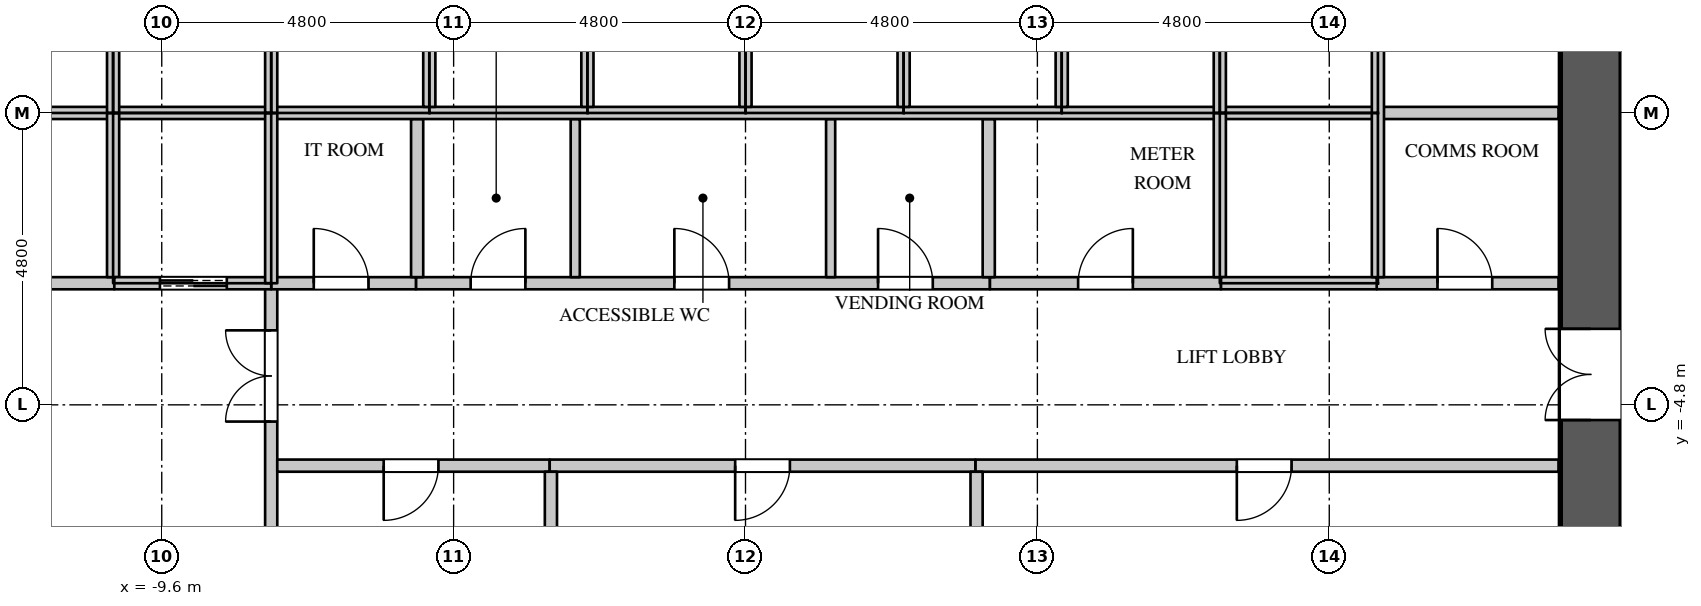
"""IFC4 building model, lengths in metres.
Left out: names, types, materials, properties, quantities, classifications, styles, units other than length and angle.
Written with IfcOpenShell. Run it as: python <this file> out.ifc"""

import sys

from ifc_helpers import new_model, si_unit, direction, frame, frame_2d, origin, place, context, subcontext, project, spatial, rectangle, extrude, element, fill, save


model = new_model("IFC4")
c1 = context("Model", 3, precision=1e-05, world=origin(), true_north=direction((0.0, 1.0)))
c2 = subcontext(c1, "Body", "Model", "MODEL_VIEW")
j1 = project(units=[si_unit("LENGTHUNIT", "METRE"), si_unit("PLANEANGLEUNIT", "RADIAN")], contexts=[c1])
p1 = place(None, origin())
s1 = spatial("IfcSite", under=j1, at=p1, CompositionType="ELEMENT")
p2 = place(p1, origin())
s2 = spatial("IfcBuilding", under=s1, at=p2, CompositionType="ELEMENT")
p3 = place(p2, frame((0.0, 0.0, 71.7)))
s3 = spatial("IfcBuildingStorey", under=s2, at=p3, CompositionType="ELEMENT", Elevation=71.7)
p4 = place(p3, frame((13.9, -11.0, 0.0), z_axis=(0.0, 0.0, 1.0), x_axis=(0.0, 1.0, 0.0)))
e1 = element("IfcWall", 1, at=p4, inside=s3, PredefinedType="SHEAR", context=c2, shape_type="SweptSolid", body=[
    extrude(rectangle(XDim=22.0, YDim=1.0, at=frame_2d((11.0, 0.0))), origin(), (0.0, 0.0, 1.0), 4.2),
])
p5 = place(p4, frame((20.05, 0.0, 0.0)))
e2 = element("IfcOpeningElement", 2, at=p5, cuts=e1, PredefinedType="OPENING", context=c2, shape_type="SweptSolid", body=[
    extrude(rectangle(XDim=1.1, YDim=2.2, at=frame_2d((0.55, 1.1))), frame((0.0, 0.51, 0.0), z_axis=(0.0, -1.0, 0.0), x_axis=(1.0, 0.0, 0.0)), (0.0, 0.0, 1.0), 1.02),
])
p6 = place(p4, frame((0.85, 0.0, 0.0)))
e3 = element("IfcOpeningElement", 3, at=p6, cuts=e1, PredefinedType="OPENING", context=c2, shape_type="SweptSolid", body=[
    extrude(rectangle(XDim=1.1, YDim=2.2, at=frame_2d((0.55, 1.1))), frame((0.0, 0.51, 0.0), z_axis=(0.0, -1.0, 0.0), x_axis=(1.0, 0.0, 0.0)), (0.0, 0.0, 1.0), 1.02),
])
p7 = place(p4, frame((14.55, 0.0, 0.0)))
e4 = element("IfcOpeningElement", 4, at=p7, cuts=e1, PredefinedType="OPENING", context=c2, shape_type="SweptSolid", body=[
    extrude(rectangle(XDim=1.5, YDim=2.4, at=frame_2d((0.75, 1.2))), frame((0.0, 0.51, 0.0), z_axis=(0.0, -1.0, 0.0), x_axis=(1.0, 0.0, 0.0)), (0.0, 0.0, 1.0), 1.02),
])
p8 = place(p4, frame((5.95, 0.0, 0.0)))
e5 = element("IfcOpeningElement", 5, at=p8, cuts=e1, PredefinedType="OPENING", context=c2, shape_type="SweptSolid", body=[
    extrude(rectangle(XDim=1.5, YDim=2.4, at=frame_2d((0.75, 1.2))), frame((0.0, 0.51, 0.0), z_axis=(0.0, -1.0, 0.0), x_axis=(1.0, 0.0, 0.0)), (0.0, 0.0, 1.0), 1.02),
])
p9 = place(p3, frame((-7.8, -8.075, 0.0), z_axis=(0.0, 0.0, 1.0), x_axis=(0.0, 1.0, 0.0)))
e6 = element("IfcWall", 6, at=p9, inside=s3, PredefinedType="PARTITIONING", context=c2, shape_type="SweptSolid", body=[
    extrude(rectangle(XDim=5.275, YDim=0.2, at=frame_2d((2.637, 0.0))), origin(), (0.0, 0.0, 1.0), 3.95),
])
p10 = place(p9, frame((3.0, 0.0, 0.0)))
e7 = element("IfcOpeningElement", 7, at=p10, cuts=e6, PredefinedType="OPENING", context=c2, shape_type="SweptSolid", body=[
    extrude(rectangle(XDim=1.5, YDim=2.4, at=frame_2d((0.75, 1.2))), frame((0.0, 0.11, 0.0), z_axis=(0.0, -1.0, 0.0), x_axis=(1.0, 0.0, 0.0)), (0.0, 0.0, 1.0), 0.22),
])
p11 = place(p3, frame((-7.7, -5.8, 0.0), z_axis=(0.0, 0.0, 1.0), x_axis=(1.0, 0.0, 0.0)))
e8 = element("IfcWall", 8, at=p11, inside=s3, PredefinedType="PARTITIONING", context=c2, shape_type="SweptSolid", body=[
    extrude(rectangle(XDim=4.48, YDim=0.2, at=frame_2d((2.24, 0.0))), origin(), (0.0, 0.0, 1.0), 3.95),
])
p12 = place(p11, frame((1.75, 0.0, 0.0)))
e9 = element("IfcOpeningElement", 9, at=p12, cuts=e8, PredefinedType="OPENING", context=c2, shape_type="SweptSolid", body=[
    extrude(rectangle(XDim=0.9, YDim=2.2, at=frame_2d((0.45, 1.1))), frame((0.0, 0.11, 0.0), z_axis=(0.0, -1.0, 0.0), x_axis=(1.0, 0.0, 0.0)), (0.0, 0.0, 1.0), 0.22),
])
p13 = place(p3, frame((-5.42, -2.8, 0.0), z_axis=(0.0, 0.0, 1.0), x_axis=(1.0, 0.0, 0.0)))
e10 = element("IfcWall", 10, at=p13, inside=s3, PredefinedType="PARTITIONING", context=c2, shape_type="SweptSolid", body=[
    extrude(rectangle(XDim=9.44, YDim=0.2, at=frame_2d((4.72, 0.0))), origin(), (0.0, 0.0, 1.0), 3.95),
])
p14 = place(p13, frame((0.9, 0.0, 0.0)))
e11 = element("IfcOpeningElement", 11, at=p14, cuts=e10, PredefinedType="OPENING", context=c2, shape_type="SweptSolid", body=[
    extrude(rectangle(XDim=0.9, YDim=2.2, at=frame_2d((0.45, 1.1))), frame((0.0, 0.11, 0.0), z_axis=(0.0, -1.0, 0.0), x_axis=(1.0, 0.0, 0.0)), (0.0, 0.0, 1.0), 0.22),
])
p15 = place(p13, frame((4.25, 0.0, 0.0)))
e12 = element("IfcOpeningElement", 12, at=p15, cuts=e10, PredefinedType="OPENING", context=c2, shape_type="SweptSolid", body=[
    extrude(rectangle(XDim=0.9, YDim=2.2, at=frame_2d((0.45, 1.1))), frame((0.0, 0.11, 0.0), z_axis=(0.0, -1.0, 0.0), x_axis=(1.0, 0.0, 0.0)), (0.0, 0.0, 1.0), 0.22),
])
p16 = place(p13, frame((7.6, 0.0, 0.0)))
e13 = element("IfcOpeningElement", 13, at=p16, cuts=e10, PredefinedType="OPENING", context=c2, shape_type="SweptSolid", body=[
    extrude(rectangle(XDim=0.9, YDim=2.2, at=frame_2d((0.45, 1.1))), frame((0.0, 0.11, 0.0), z_axis=(0.0, -1.0, 0.0), x_axis=(1.0, 0.0, 0.0)), (0.0, 0.0, 1.0), 0.22),
])
p17 = place(p3, frame((3.78, -5.8, 0.0), z_axis=(0.0, 0.0, 1.0), x_axis=(1.0, 0.0, 0.0)))
e14 = element("IfcWall", 14, at=p17, inside=s3, PredefinedType="PARTITIONING", context=c2, shape_type="SweptSolid", body=[
    extrude(rectangle(XDim=9.59, YDim=0.2, at=frame_2d((4.795, 0.0))), origin(), (0.0, 0.0, 1.0), 3.95),
])
p18 = place(p17, frame((4.3, 0.0, 0.0)))
e15 = element("IfcOpeningElement", 15, at=p18, cuts=e14, PredefinedType="OPENING", context=c2, shape_type="SweptSolid", body=[
    extrude(rectangle(XDim=0.9, YDim=2.2, at=frame_2d((0.45, 1.1))), frame((0.0, 0.11, 0.0), z_axis=(0.0, -1.0, 0.0), x_axis=(1.0, 0.0, 0.0)), (0.0, 0.0, 1.0), 0.22),
])
for number, where, z_axis, x_axis in (
    (16, (-2.8, -2.7, 0.0), (0.0, 0.0, 1.0), (0.0, 1.0, 0.0)),
    (17, (1.4, -2.7, 0.0), (0.0, 0.0, 1.0), (0.0, 1.0, 0.0)),
):
    element("IfcWall", number, at=place(p3, frame(where, z_axis=z_axis, x_axis=x_axis)), inside=s3, PredefinedType="PARTITIONING", context=c2, shape_type="SweptSolid", body=[
        extrude(rectangle(XDim=2.6, YDim=0.15, at=frame_2d((1.3, 0.0))), origin(), (0.0, 0.0, 1.0), 3.95),
    ])
p19 = place(p3, frame((-13.37, -2.8, 0.0), z_axis=(0.0, 0.0, 1.0), x_axis=(1.0, 0.0, 0.0)))
e18 = element("IfcWall", 18, at=p19, inside=s3, PredefinedType="PARTITIONING", context=c2, shape_type="SweptSolid", body=[
    extrude(rectangle(XDim=2.99, YDim=0.2, at=frame_2d((1.495, 0.0))), origin(), (0.0, 0.0, 1.0), 3.95),
])
p20 = place(p19, frame((1.2, 0.0, 0.0)))
e19 = element("IfcOpeningElement", 19, at=p20, cuts=e18, PredefinedType="OPENING", context=c2, shape_type="SweptSolid", body=[
    extrude(rectangle(XDim=0.6, YDim=2.0, at=frame_2d((0.3, 1.0))), frame((0.0, 0.11, 0.0), z_axis=(0.0, -1.0, 0.0), x_axis=(1.0, 0.0, 0.0)), (0.0, 0.0, 1.0), 0.22),
])
p21 = place(p3, frame((-7.8, -2.8, 0.0), z_axis=(0.0, 0.0, 1.0), x_axis=(1.0, 0.0, 0.0)))
e20 = element("IfcWall", 20, at=p21, inside=s3, PredefinedType="PARTITIONING", context=c2, shape_type="SweptSolid", body=[
    extrude(rectangle(XDim=2.38, YDim=0.2, at=frame_2d((1.19, 0.0))), origin(), (0.0, 0.0, 1.0), 3.95),
])
p22 = place(p21, frame((0.7, 0.0, 0.0)))
e21 = element("IfcOpeningElement", 21, at=p22, cuts=e20, PredefinedType="OPENING", context=c2, shape_type="SweptSolid", body=[
    extrude(rectangle(XDim=0.9, YDim=2.2, at=frame_2d((0.45, 1.1))), frame((0.0, 0.11, 0.0), z_axis=(0.0, -1.0, 0.0), x_axis=(1.0, 0.0, 0.0)), (0.0, 0.0, 1.0), 0.22),
])
p23 = place(p3, frame((-5.4, -2.7, 0.0), z_axis=(0.0, 0.0, 1.0), x_axis=(0.0, 1.0, 0.0)))
e22 = element("IfcWall", 22, at=p23, inside=s3, PredefinedType="PARTITIONING", context=c2, shape_type="SweptSolid", body=[
    extrude(rectangle(XDim=2.6, YDim=0.2, at=frame_2d((1.3, 0.0))), origin(), (0.0, 0.0, 1.0), 3.95),
])
p24 = place(p3, frame((-3.22, -5.8, 0.0), z_axis=(0.0, 0.0, 1.0), x_axis=(1.0, 0.0, 0.0)))
e23 = element("IfcWall", 23, at=p24, inside=s3, PredefinedType="PARTITIONING", context=c2, shape_type="SweptSolid", body=[
    extrude(rectangle(XDim=7.0, YDim=0.2, at=frame_2d((3.5, 0.0))), origin(), (0.0, 0.0, 1.0), 3.95),
])
p25 = place(p24, frame((3.05, 0.0, 0.0)))
e24 = element("IfcOpeningElement", 24, at=p25, cuts=e23, PredefinedType="OPENING", context=c2, shape_type="SweptSolid", body=[
    extrude(rectangle(XDim=0.9, YDim=2.2, at=frame_2d((0.45, 1.1))), frame((0.0, 0.11, 0.0), z_axis=(0.0, -1.0, 0.0), x_axis=(1.0, 0.0, 0.0)), (0.0, 0.0, 1.0), 0.22),
])
for number, where, z_axis, x_axis in (
    (25, (-3.2, -10.97, 0.0), (0.0, 0.0, 1.0), (0.0, 1.0, 0.0)),
    (26, (3.8, -10.97, 0.0), (0.0, 0.0, 1.0), (0.0, 1.0, 0.0)),
):
    element("IfcWall", number, at=place(p3, frame(where, z_axis=z_axis, x_axis=x_axis)), inside=s3, PredefinedType="PARTITIONING", context=c2, shape_type="SweptSolid", body=[
        extrude(rectangle(XDim=5.07, YDim=0.2, at=frame_2d((2.535, 0.0))), origin(), (0.0, 0.0, 1.0), 3.95),
    ])
p26 = place(p3, frame((4.02, -2.8, 0.0), z_axis=(0.0, 0.0, 1.0), x_axis=(1.0, 0.0, 0.0)))
e27 = element("IfcWall", 27, at=p26, inside=s3, PredefinedType="PARTITIONING", context=c2, shape_type="SweptSolid", body=[
    extrude(rectangle(XDim=3.8, YDim=0.2, at=frame_2d((1.9, 0.0))), origin(), (0.0, 0.0, 1.0), 3.95),
])
p27 = place(p26, frame((1.45, 0.0, 0.0)))
e28 = element("IfcOpeningElement", 28, at=p27, cuts=e27, PredefinedType="OPENING", context=c2, shape_type="SweptSolid", body=[
    extrude(rectangle(XDim=0.9, YDim=2.2, at=frame_2d((0.45, 1.1))), frame((0.0, 0.11, 0.0), z_axis=(0.0, -1.0, 0.0), x_axis=(1.0, 0.0, 0.0)), (0.0, 0.0, 1.0), 0.22),
])
p28 = place(p3, frame((4.0, -2.7, 0.0), z_axis=(0.0, 0.0, 1.0), x_axis=(0.0, 1.0, 0.0)))
e29 = element("IfcWall", 29, at=p28, inside=s3, PredefinedType="PARTITIONING", context=c2, shape_type="SweptSolid", body=[
    extrude(rectangle(XDim=2.6, YDim=0.2, at=frame_2d((1.3, 0.0))), origin(), (0.0, 0.0, 1.0), 3.95),
])
p29 = place(p3, frame((10.38, -2.8, 0.0), z_axis=(0.0, 0.0, 1.0), x_axis=(1.0, 0.0, 0.0)))
e30 = element("IfcWall", 30, at=p29, inside=s3, PredefinedType="PARTITIONING", context=c2, shape_type="SweptSolid", body=[
    extrude(rectangle(XDim=2.99, YDim=0.2, at=frame_2d((1.495, 0.0))), origin(), (0.0, 0.0, 1.0), 3.95),
])
p30 = place(p29, frame((1.0, 0.0, 0.0)))
e31 = element("IfcOpeningElement", 31, at=p30, cuts=e30, PredefinedType="OPENING", context=c2, shape_type="SweptSolid", body=[
    extrude(rectangle(XDim=0.9, YDim=2.2, at=frame_2d((0.45, 1.1))), frame((0.0, 0.11, 0.0), z_axis=(0.0, -1.0, 0.0), x_axis=(1.0, 0.0, 0.0)), (0.0, 0.0, 1.0), 0.22),
])
p31 = place(p3, frame((10.4, 0.0, 0.0), z_axis=(0.0, 0.0, 1.0), x_axis=(1.0, 0.0, 0.0)))
e32 = element("IfcWall", 32, at=p31, inside=s3, PredefinedType="PARTITIONING", context=c2, shape_type="SweptSolid", body=[
    extrude(rectangle(XDim=2.97, YDim=0.2, at=frame_2d((1.485, 0.0))), origin(), (0.0, 0.0, 1.0), 3.95),
])
p32 = place(p3, frame((-13.37, 0.0, 0.0), z_axis=(0.0, 0.0, 1.0), x_axis=(1.0, 0.0, 0.0)))
e33 = element("IfcWall", 33, at=p32, inside=s3, PredefinedType="PARTITIONING", context=c2, shape_type="SweptSolid", body=[
    extrude(rectangle(XDim=23.77, YDim=0.2, at=frame_2d((11.885, 0.0))), origin(), (0.0, 0.0, 1.0), 3.95),
])
p33 = place(p3, frame((-10.4, -2.7, 0.0), z_axis=(0.0, 0.0, 1.0), x_axis=(0.0, 1.0, 0.0)))
e34 = element("IfcWall", 34, at=p33, inside=s3, PredefinedType="PARTITIONING", context=c2, shape_type="SweptSolid", body=[
    extrude(rectangle(XDim=2.7, YDim=0.2, at=frame_2d((1.35, 0.0))), origin(), (0.0, 0.0, 1.0), 3.95),
])
p34 = place(p3, frame((-10.38, -2.8, 0.0), z_axis=(0.0, 0.0, 1.0), x_axis=(1.0, 0.0, 0.0)))
e35 = element("IfcWall", 35, at=p34, inside=s3, PredefinedType="PARTITIONING", context=c2, shape_type="SweptSolid", body=[
    extrude(rectangle(XDim=2.58, YDim=0.2, at=frame_2d((1.29, 0.0))), origin(), (0.0, 0.0, 1.0), 3.95),
])
p35 = place(p34, frame((0.75, 0.0, 0.0)))
e36 = element("IfcOpeningElement", 36, at=p35, cuts=e35, PredefinedType="OPENING", context=c2, shape_type="SweptSolid", body=[
    extrude(rectangle(XDim=1.1, YDim=2.2, at=frame_2d((0.55, 1.1))), frame((0.0, 0.11, 0.0), z_axis=(0.0, -1.0, 0.0), x_axis=(1.0, 0.0, 0.0)), (0.0, 0.0, 1.0), 0.22),
])
p36 = place(p3, frame((-10.4, 0.0, 0.0), z_axis=(0.0, 0.0, 1.0), x_axis=(0.0, 1.0, 0.0)))
e37 = element("IfcWall", 37, at=p36, inside=s3, PredefinedType="PARTITIONING", context=c2, shape_type="SweptSolid", body=[
    extrude(rectangle(XDim=2.7, YDim=0.2, at=frame_2d((1.35, 0.0))), origin(), (0.0, 0.0, 1.0), 3.95),
])
for number, where, z_axis, x_axis in (
    (38, (-7.8, -2.8, 0.0), (0.0, 0.0, 1.0), (0.0, 1.0, 0.0)),
    (39, (-7.8, 0.0, 0.0), (0.0, 0.0, 1.0), (0.0, 1.0, 0.0)),
):
    element("IfcWall", number, at=place(p3, frame(where, z_axis=z_axis, x_axis=x_axis)), inside=s3, PredefinedType="PARTITIONING", context=c2, shape_type="SweptSolid", body=[
        extrude(rectangle(XDim=2.8, YDim=0.2, at=frame_2d((1.4, 0.0))), origin(), (0.0, 0.0, 1.0), 3.95),
    ])
for number, where, z_axis, x_axis in (
    (40, (-5.2, 0.1, 0.0), (0.0, 0.0, 1.0), (0.0, 1.0, 0.0)),
    (41, (-2.6, 0.1, 0.0), (0.0, 0.0, 1.0), (0.0, 1.0, 0.0)),
    (42, (0.0, 0.1, 0.0), (0.0, 0.0, 1.0), (0.0, 1.0, 0.0)),
    (43, (2.6, 0.1, 0.0), (0.0, 0.0, 1.0), (0.0, 1.0, 0.0)),
    (44, (5.2, 0.1, 0.0), (0.0, 0.0, 1.0), (0.0, 1.0, 0.0)),
):
    element("IfcWall", number, at=place(p3, frame(where, z_axis=z_axis, x_axis=x_axis)), inside=s3, PredefinedType="PARTITIONING", context=c2, shape_type="SweptSolid", body=[
        extrude(rectangle(XDim=2.6, YDim=0.2, at=frame_2d((1.3, 0.0))), origin(), (0.0, 0.0, 1.0), 3.95),
    ])
p37 = place(p3, frame((7.8, -2.7, 0.0), z_axis=(0.0, 0.0, 1.0), x_axis=(0.0, 1.0, 0.0)))
e45 = element("IfcWall", 45, at=p37, inside=s3, PredefinedType="PARTITIONING", context=c2, shape_type="SweptSolid", body=[
    extrude(rectangle(XDim=2.7, YDim=0.2, at=frame_2d((1.35, 0.0))), origin(), (0.0, 0.0, 1.0), 3.95),
])
p38 = place(p3, frame((7.82, -2.8, 0.0), z_axis=(0.0, 0.0, 1.0), x_axis=(1.0, 0.0, 0.0)))
e46 = element("IfcWall", 46, at=p38, inside=s3, PredefinedType="PARTITIONING", context=c2, shape_type="SweptSolid", body=[
    extrude(rectangle(XDim=2.56, YDim=0.2, at=frame_2d((1.28, 0.0))), origin(), (0.0, 0.0, 1.0), 3.95),
])
p39 = place(p3, frame((7.8, 0.0, 0.0), z_axis=(0.0, 0.0, 1.0), x_axis=(0.0, 1.0, 0.0)))
e47 = element("IfcWall", 47, at=p39, inside=s3, PredefinedType="PARTITIONING", context=c2, shape_type="SweptSolid", body=[
    extrude(rectangle(XDim=2.7, YDim=0.2, at=frame_2d((1.35, 0.0))), origin(), (0.0, 0.0, 1.0), 3.95),
])
p40 = place(p3, frame((10.4, -2.7, 0.0), z_axis=(0.0, 0.0, 1.0), x_axis=(0.0, 1.0, 0.0)))
e48 = element("IfcWall", 48, at=p40, inside=s3, PredefinedType="PARTITIONING", context=c2, shape_type="SweptSolid", body=[
    extrude(rectangle(XDim=5.4, YDim=0.2, at=frame_2d((2.7, 0.0))), origin(), (0.0, 0.0, 1.0), 3.95),
])
p41 = place(p30, origin())
e49 = element("IfcDoor", 49, at=p41, inside=s3, OperationType="SINGLE_SWING_LEFT", PredefinedType="DOOR", context=c2, shape_type="SweptSolid", body=[
    extrude(rectangle(XDim=0.9, YDim=2.2, at=frame_2d((0.45, 1.1))), frame((0.0, 0.025, 0.0), z_axis=(0.0, -1.0, 0.0), x_axis=(1.0, 0.0, 0.0)), (0.0, 0.0, 1.0), 0.05),
])
fill(e31, e49)
p42 = place(p12, origin())
e50 = element("IfcDoor", 50, at=p42, inside=s3, OperationType="SINGLE_SWING_RIGHT", PredefinedType="DOOR", context=c2, shape_type="SweptSolid", body=[
    extrude(rectangle(XDim=0.9, YDim=2.2, at=frame_2d((0.45, 1.1))), frame((0.0, 0.025, 0.0), z_axis=(0.0, -1.0, 0.0), x_axis=(1.0, 0.0, 0.0)), (0.0, 0.0, 1.0), 0.05),
])
fill(e9, e50)
p43 = place(p25, origin())
e51 = element("IfcDoor", 51, at=p43, inside=s3, OperationType="SINGLE_SWING_RIGHT", PredefinedType="DOOR", context=c2, shape_type="SweptSolid", body=[
    extrude(rectangle(XDim=0.9, YDim=2.2, at=frame_2d((0.45, 1.1))), frame((0.0, 0.025, 0.0), z_axis=(0.0, -1.0, 0.0), x_axis=(1.0, 0.0, 0.0)), (0.0, 0.0, 1.0), 0.05),
])
fill(e24, e51)
p44 = place(p18, origin())
e52 = element("IfcDoor", 52, at=p44, inside=s3, OperationType="SINGLE_SWING_RIGHT", PredefinedType="DOOR", context=c2, shape_type="SweptSolid", body=[
    extrude(rectangle(XDim=0.9, YDim=2.2, at=frame_2d((0.45, 1.1))), frame((0.0, 0.025, 0.0), z_axis=(0.0, -1.0, 0.0), x_axis=(1.0, 0.0, 0.0)), (0.0, 0.0, 1.0), 0.05),
])
fill(e15, e52)
p45 = place(p22, origin())
e53 = element("IfcDoor", 53, at=p45, inside=s3, OperationType="SINGLE_SWING_LEFT", PredefinedType="DOOR", context=c2, shape_type="SweptSolid", body=[
    extrude(rectangle(XDim=0.9, YDim=2.2, at=frame_2d((0.45, 1.1))), frame((0.0, 0.025, 0.0), z_axis=(0.0, -1.0, 0.0), x_axis=(1.0, 0.0, 0.0)), (0.0, 0.0, 1.0), 0.05),
])
fill(e21, e53)
p46 = place(p14, origin())
e54 = element("IfcDoor", 54, at=p46, inside=s3, OperationType="SINGLE_SWING_RIGHT", PredefinedType="DOOR", context=c2, shape_type="SweptSolid", body=[
    extrude(rectangle(XDim=0.9, YDim=2.2, at=frame_2d((0.45, 1.1))), frame((0.0, 0.025, 0.0), z_axis=(0.0, -1.0, 0.0), x_axis=(1.0, 0.0, 0.0)), (0.0, 0.0, 1.0), 0.05),
])
fill(e11, e54)
p47 = place(p15, origin())
e55 = element("IfcDoor", 55, at=p47, inside=s3, OperationType="SINGLE_SWING_LEFT", PredefinedType="DOOR", context=c2, shape_type="SweptSolid", body=[
    extrude(rectangle(XDim=0.9, YDim=2.2, at=frame_2d((0.45, 1.1))), frame((0.0, 0.025, 0.0), z_axis=(0.0, -1.0, 0.0), x_axis=(1.0, 0.0, 0.0)), (0.0, 0.0, 1.0), 0.05),
])
fill(e12, e55)
p48 = place(p16, origin())
e56 = element("IfcDoor", 56, at=p48, inside=s3, OperationType="SINGLE_SWING_LEFT", PredefinedType="DOOR", context=c2, shape_type="SweptSolid", body=[
    extrude(rectangle(XDim=0.9, YDim=2.2, at=frame_2d((0.45, 1.1))), frame((0.0, 0.025, 0.0), z_axis=(0.0, -1.0, 0.0), x_axis=(1.0, 0.0, 0.0)), (0.0, 0.0, 1.0), 0.05),
])
fill(e13, e56)
p49 = place(p27, origin())
e57 = element("IfcDoor", 57, at=p49, inside=s3, OperationType="SINGLE_SWING_RIGHT", PredefinedType="DOOR", context=c2, shape_type="SweptSolid", body=[
    extrude(rectangle(XDim=0.9, YDim=2.2, at=frame_2d((0.45, 1.1))), frame((0.0, 0.025, 0.0), z_axis=(0.0, -1.0, 0.0), x_axis=(1.0, 0.0, 0.0)), (0.0, 0.0, 1.0), 0.05),
])
fill(e28, e57)
p50 = place(p35, origin())
e58 = element("IfcDoor", 58, at=p50, inside=s3, OperationType="DOUBLE_DOOR_SLIDING", PredefinedType="DOOR", context=c2, shape_type="SweptSolid", body=[
    extrude(rectangle(XDim=1.1, YDim=2.2, at=frame_2d((0.55, 1.1))), frame((0.0, 0.025, 0.0), z_axis=(0.0, -1.0, 0.0), x_axis=(1.0, 0.0, 0.0)), (0.0, 0.0, 1.0), 0.05),
])
fill(e36, e58)
p51 = place(p10, origin())
e59 = element("IfcDoor", 59, at=p51, inside=s3, OperationType="DOUBLE_DOOR_SINGLE_SWING", PredefinedType="DOOR", context=c2, shape_type="SweptSolid", body=[
    extrude(rectangle(XDim=1.5, YDim=2.4, at=frame_2d((0.75, 1.2))), frame((0.0, 0.025, 0.0), z_axis=(0.0, -1.0, 0.0), x_axis=(1.0, 0.0, 0.0)), (0.0, 0.0, 1.0), 0.05),
])
fill(e7, e59)
p52 = place(p8, origin())
e60 = element("IfcDoor", 60, at=p52, inside=s3, OperationType="DOUBLE_DOOR_SINGLE_SWING", PredefinedType="DOOR", context=c2, shape_type="SweptSolid", body=[
    extrude(rectangle(XDim=1.5, YDim=2.4, at=frame_2d((0.75, 1.2))), frame((0.0, 0.495, 0.0), z_axis=(0.0, -1.0, 0.0), x_axis=(1.0, 0.0, 0.0)), (0.0, 0.0, 1.0), 0.05),
])
fill(e5, e60)
save(model, sys.argv[1])
